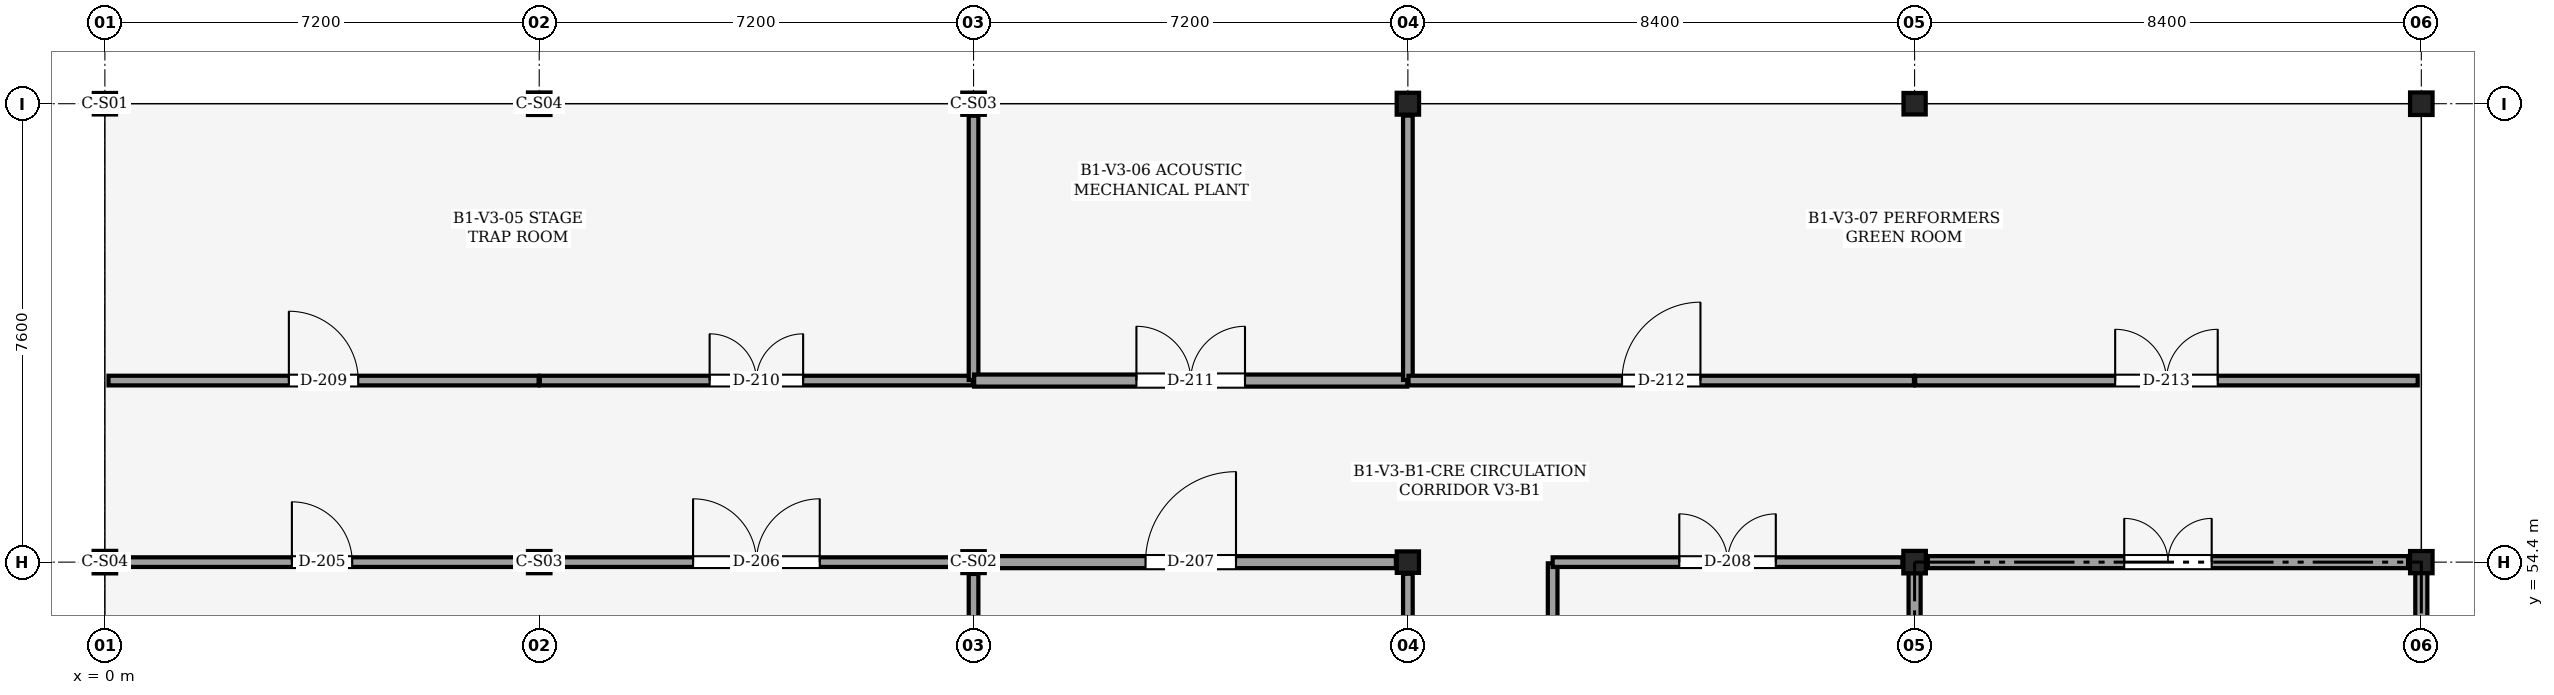
"""IFC4 building model, lengths in metres.
Left out: names, types, materials, properties, quantities, classifications, styles, units other than length and angle.
Written with IfcOpenShell. Run it as: python <this file> out.ifc"""

import sys

from ifc_helpers import new_model, si_unit, direction, frame, frame_2d, origin, origin_2d, place, context, subcontext, project, spatial, rectangle, i_section, extrude, element, fill, save


model = new_model("IFC4")
c1 = context("Model", 3, precision=1e-05, world=origin(), true_north=direction((0.0, 1.0)))
c2 = subcontext(c1, "Body", "Model", "MODEL_VIEW")
j1 = project(units=[si_unit("LENGTHUNIT", "METRE"), si_unit("PLANEANGLEUNIT", "RADIAN")], contexts=[c1])
p1 = place(None, origin())
s1 = spatial("IfcSite", under=j1, at=p1, CompositionType="ELEMENT")
p2 = place(p1, origin())
s2 = spatial("IfcBuilding", under=s1, at=p2, CompositionType="ELEMENT")
p3 = place(p2, frame((0.0, 0.0, -5.4)))
s3 = spatial("IfcBuildingStorey", under=s2, at=p3, CompositionType="ELEMENT", Elevation=-5.4)
p4 = place(p3, frame((0.0, 54.4, 0.0), z_axis=(0.0, 0.0, 1.0), x_axis=(1.0, 0.0, 0.0)))
e1 = element("IfcColumn", 1, at=p4, inside=s3, PredefinedType="COLUMN", context=c2, shape_type="SweptSolid", body=[
    extrude(i_section(OverallWidth=0.373, OverallDepth=0.373, WebThickness=0.016, FlangeThickness=0.026, FilletRadius=0.025, at=origin_2d()), origin(), (0.0, 0.0, 1.0), 5.4),
])
p5 = place(p3, frame((0.0, 62.0, 0.0), z_axis=(0.0, 0.0, 1.0), x_axis=(1.0, 0.0, 0.0)))
e2 = element("IfcColumn", 2, at=p5, inside=s3, PredefinedType="COLUMN", context=c2, shape_type="SweptSolid", body=[
    extrude(i_section(OverallWidth=0.368, OverallDepth=0.356, WebThickness=0.011, FlangeThickness=0.018, FilletRadius=0.025, at=origin_2d()), origin(), (0.0, 0.0, 1.0), 5.4),
])
p6 = place(p3, frame((7.2, 54.4, 0.0), z_axis=(0.0, 0.0, 1.0), x_axis=(1.0, 0.0, 0.0)))
e3 = element("IfcColumn", 3, at=p6, inside=s3, PredefinedType="COLUMN", context=c2, shape_type="SweptSolid", body=[
    extrude(i_section(OverallWidth=0.373, OverallDepth=0.368, WebThickness=0.015, FlangeThickness=0.024, FilletRadius=0.025, at=origin_2d()), origin(), (0.0, 0.0, 1.0), 5.4),
])
p7 = place(p3, frame((7.2, 62.0, 0.0), z_axis=(0.0, 0.0, 1.0), x_axis=(1.0, 0.0, 0.0)))
e4 = element("IfcColumn", 4, at=p7, inside=s3, PredefinedType="COLUMN", context=c2, shape_type="SweptSolid", body=[
    extrude(i_section(OverallWidth=0.373, OverallDepth=0.373, WebThickness=0.016, FlangeThickness=0.026, FilletRadius=0.025, at=origin_2d()), origin(), (0.0, 0.0, 1.0), 5.4),
])
p8 = place(p3, frame((14.4, 54.4, 0.0), z_axis=(0.0, 0.0, 1.0), x_axis=(1.0, 0.0, 0.0)))
e5 = element("IfcColumn", 5, at=p8, inside=s3, PredefinedType="COLUMN", context=c2, shape_type="SweptSolid", body=[
    extrude(i_section(OverallWidth=0.371, OverallDepth=0.363, WebThickness=0.013, FlangeThickness=0.022, FilletRadius=0.025, at=origin_2d()), origin(), (0.0, 0.0, 1.0), 5.4),
])
p9 = place(p3, frame((14.4, 62.0, 0.0), z_axis=(0.0, 0.0, 1.0), x_axis=(1.0, 0.0, 0.0)))
e6 = element("IfcColumn", 6, at=p9, inside=s3, PredefinedType="COLUMN", context=c2, shape_type="SweptSolid", body=[
    extrude(i_section(OverallWidth=0.373, OverallDepth=0.368, WebThickness=0.015, FlangeThickness=0.024, FilletRadius=0.025, at=origin_2d()), origin(), (0.0, 0.0, 1.0), 5.4),
])
p10 = place(p3, frame((21.6, 54.4, 0.0), z_axis=(0.0, 0.0, 1.0), x_axis=(1.0, 0.0, 0.0)))
e7 = element("IfcColumn", 7, at=p10, inside=s3, PredefinedType="COLUMN", context=c2, shape_type="SweptSolid", body=[
    extrude(i_section(OverallWidth=0.368, OverallDepth=0.356, WebThickness=0.011, FlangeThickness=0.018, FilletRadius=0.025, at=origin_2d()), origin(), (0.0, 0.0, 1.0), 5.4),
])
p11 = place(p3, frame((21.6, 62.0, 0.0), z_axis=(0.0, 0.0, 1.0), x_axis=(1.0, 0.0, 0.0)))
e8 = element("IfcColumn", 8, at=p11, inside=s3, PredefinedType="COLUMN", context=c2, shape_type="SweptSolid", body=[
    extrude(i_section(OverallWidth=0.371, OverallDepth=0.363, WebThickness=0.013, FlangeThickness=0.022, FilletRadius=0.025, at=origin_2d()), origin(), (0.0, 0.0, 1.0), 5.4),
])
p12 = place(p3, frame((30.0, 54.4, 0.0), z_axis=(0.0, 0.0, 1.0), x_axis=(1.0, 0.0, 0.0)))
e9 = element("IfcColumn", 9, at=p12, inside=s3, PredefinedType="COLUMN", context=c2, shape_type="SweptSolid", body=[
    extrude(i_section(OverallWidth=0.373, OverallDepth=0.373, WebThickness=0.016, FlangeThickness=0.026, FilletRadius=0.025, at=origin_2d()), origin(), (0.0, 0.0, 1.0), 5.4),
])
p13 = place(p3, frame((30.0, 62.0, 0.0), z_axis=(0.0, 0.0, 1.0), x_axis=(1.0, 0.0, 0.0)))
e10 = element("IfcColumn", 10, at=p13, inside=s3, PredefinedType="COLUMN", context=c2, shape_type="SweptSolid", body=[
    extrude(i_section(OverallWidth=0.368, OverallDepth=0.356, WebThickness=0.011, FlangeThickness=0.018, FilletRadius=0.025, at=origin_2d()), origin(), (0.0, 0.0, 1.0), 5.4),
])
p14 = place(p3, frame((38.4, 54.4, 0.0), z_axis=(0.0, 0.0, 1.0), x_axis=(1.0, 0.0, 0.0)))
e11 = element("IfcColumn", 11, at=p14, inside=s3, PredefinedType="COLUMN", context=c2, shape_type="SweptSolid", body=[
    extrude(i_section(OverallWidth=0.373, OverallDepth=0.368, WebThickness=0.015, FlangeThickness=0.024, FilletRadius=0.025, at=origin_2d()), origin(), (0.0, 0.0, 1.0), 5.4),
])
p15 = place(p3, frame((38.4, 62.0, 0.0), z_axis=(0.0, 0.0, 1.0), x_axis=(1.0, 0.0, 0.0)))
e12 = element("IfcColumn", 12, at=p15, inside=s3, PredefinedType="COLUMN", context=c2, shape_type="SweptSolid", body=[
    extrude(i_section(OverallWidth=0.373, OverallDepth=0.373, WebThickness=0.016, FlangeThickness=0.026, FilletRadius=0.025, at=origin_2d()), origin(), (0.0, 0.0, 1.0), 5.4),
])
p16 = place(p3, frame((30.0, 51.12, 0.0), z_axis=(0.0, 0.0, 1.0), x_axis=(0.0, 1.0, 0.0)))
e13 = element("IfcWall", 13, at=p16, inside=s3, PredefinedType="PARTITIONING", context=c2, shape_type="SweptSolid", body=[
    extrude(rectangle(XDim=3.26, YDim=0.2, at=frame_2d((1.63, 0.0))), origin(), (0.0, 0.0, 1.0), 4.638),
])
p17 = place(p3, frame((38.4, 51.12, 0.0), z_axis=(0.0, 0.0, 1.0), x_axis=(0.0, 1.0, 0.0)))
e14 = element("IfcWall", 14, at=p17, inside=s3, PredefinedType="PARTITIONING", context=c2, shape_type="SweptSolid", body=[
    extrude(rectangle(XDim=3.26, YDim=0.2, at=frame_2d((1.63, 0.0))), origin(), (0.0, 0.0, 1.0), 4.488),
])
p18 = place(p3, frame((30.22, 54.4, 0.0), z_axis=(0.0, 0.0, 1.0), x_axis=(1.0, 0.0, 0.0)))
e15 = element("IfcWall", 15, at=p18, inside=s3, PredefinedType="PARTITIONING", context=c2, shape_type="SweptSolid", body=[
    extrude(rectangle(XDim=7.96, YDim=0.2, at=frame_2d((3.98, 0.0))), origin(), (0.0, 0.0, 1.0), 4.407),
])
p19 = place(p18, frame((3.255, 0.0, 0.0)))
e16 = element("IfcOpeningElement", 16, at=p19, cuts=e15, PredefinedType="OPENING", context=c2, shape_type="SweptSolid", body=[
    extrude(rectangle(XDim=1.45, YDim=2.2, at=frame_2d((0.725, 1.1))), frame((0.0, 0.11, 0.0), z_axis=(0.0, -1.0, 0.0), x_axis=(1.0, 0.0, 0.0)), (0.0, 0.0, 1.0), 0.22),
])
p20 = place(p3, frame((0.201, 54.4, 0.0), z_axis=(0.0, 0.0, 1.0), x_axis=(1.0, 0.0, 0.0)))
e17 = element("IfcWall", 17, at=p20, inside=s3, PredefinedType="PARTITIONING", context=c2, shape_type="SweptSolid", body=[
    extrude(rectangle(XDim=6.797, YDim=0.16, at=frame_2d((3.398, 0.0))), origin(), (0.0, 0.0, 1.0), 4.493),
])
p21 = place(p20, frame((2.898, 0.0, 0.0)))
e18 = element("IfcOpeningElement", 18, at=p21, cuts=e17, PredefinedType="OPENING", context=c2, shape_type="SweptSolid", body=[
    extrude(rectangle(XDim=1.0, YDim=2.15, at=frame_2d((0.5, 1.075))), frame((0.0, 0.09, 0.0), z_axis=(0.0, -1.0, 0.0), x_axis=(1.0, 0.0, 0.0)), (0.0, 0.0, 1.0), 0.18),
])
p22 = place(p3, frame((7.402, 54.4, 0.0), z_axis=(0.0, 0.0, 1.0), x_axis=(1.0, 0.0, 0.0)))
e19 = element("IfcWall", 19, at=p22, inside=s3, PredefinedType="PARTITIONING", context=c2, shape_type="SweptSolid", body=[
    extrude(rectangle(XDim=6.798, YDim=0.16, at=frame_2d((3.399, 0.0))), origin(), (0.0, 0.0, 1.0), 4.551),
])
p23 = place(p22, frame((2.349, 0.0, 0.0)))
e20 = element("IfcOpeningElement", 20, at=p23, cuts=e19, PredefinedType="OPENING", context=c2, shape_type="SweptSolid", body=[
    extrude(rectangle(XDim=2.1, YDim=2.5, at=frame_2d((1.05, 1.25))), frame((0.0, 0.09, 0.0), z_axis=(0.0, -1.0, 0.0), x_axis=(1.0, 0.0, 0.0)), (0.0, 0.0, 1.0), 0.18),
])
p24 = place(p3, frame((14.4, 46.993, 0.0), z_axis=(0.0, 0.0, 1.0), x_axis=(0.0, 1.0, 0.0)))
e21 = element("IfcWall", 21, at=p24, inside=s3, PredefinedType="PARTITIONING", context=c2, shape_type="SweptSolid", body=[
    extrude(rectangle(XDim=7.211, YDim=0.16, at=frame_2d((3.605, 0.0))), origin(), (0.0, 0.0, 1.0), 4.493),
])
p25 = place(p3, frame((14.601, 54.4, 0.0), z_axis=(0.0, 0.0, 1.0), x_axis=(1.0, 0.0, 0.0)))
e22 = element("IfcWall", 22, at=p25, inside=s3, PredefinedType="PARTITIONING", context=c2, shape_type="SweptSolid", body=[
    extrude(rectangle(XDim=6.8, YDim=0.2, at=frame_2d((3.4, 0.0))), origin(), (0.0, 0.0, 1.0), 4.567),
])
p26 = place(p25, frame((2.65, 0.0, 0.0)))
e23 = element("IfcOpeningElement", 23, at=p26, cuts=e22, PredefinedType="OPENING", context=c2, shape_type="SweptSolid", body=[
    extrude(rectangle(XDim=1.5, YDim=2.2, at=frame_2d((0.75, 1.1))), frame((0.0, 0.11, 0.0), z_axis=(0.0, -1.0, 0.0), x_axis=(1.0, 0.0, 0.0)), (0.0, 0.0, 1.0), 0.22),
])
p27 = place(p3, frame((21.6, 47.008, 0.0), z_axis=(0.0, 0.0, 1.0), x_axis=(0.0, 1.0, 0.0)))
e24 = element("IfcWall", 24, at=p27, inside=s3, PredefinedType="PARTITIONING", context=c2, shape_type="SweptSolid", body=[
    extrude(rectangle(XDim=7.199, YDim=0.16, at=frame_2d((3.6, 0.0))), origin(), (0.0, 0.0, 1.0), 4.567),
])
p28 = place(p3, frame((24.0, 46.84, 0.0), z_axis=(0.0, 0.0, 1.0), x_axis=(0.0, 1.0, 0.0)))
e25 = element("IfcWall", 25, at=p28, inside=s3, PredefinedType="PARTITIONING", context=c2, shape_type="SweptSolid", body=[
    extrude(rectangle(XDim=7.54, YDim=0.16, at=frame_2d((3.77, 0.0))), origin(), (0.0, 0.0, 1.0), 5.1),
])
p29 = place(p3, frame((24.0, 54.4, 0.0), z_axis=(0.0, 0.0, 1.0), x_axis=(1.0, 0.0, 0.0)))
e26 = element("IfcWall", 26, at=p29, inside=s3, PredefinedType="PARTITIONING", context=c2, shape_type="SweptSolid", body=[
    extrude(rectangle(XDim=5.799, YDim=0.16, at=frame_2d((2.899, 0.0))), origin(), (0.0, 0.0, 1.0), 4.338),
])
p30 = place(p29, frame((2.099, 0.0, 0.0)))
e27 = element("IfcOpeningElement", 27, at=p30, cuts=e26, PredefinedType="OPENING", context=c2, shape_type="SweptSolid", body=[
    extrude(rectangle(XDim=1.6, YDim=2.35, at=frame_2d((0.8, 1.175))), frame((0.0, 0.09, 0.0), z_axis=(0.0, -1.0, 0.0), x_axis=(1.0, 0.0, 0.0)), (0.0, 0.0, 1.0), 0.18),
])
p31 = place(p3, frame((0.06, 57.41, 0.0), z_axis=(0.0, 0.0, 1.0), x_axis=(1.0, 0.0, 0.0)))
e28 = element("IfcWall", 28, at=p31, inside=s3, PredefinedType="PARTITIONING", context=c2, shape_type="SweptSolid", body=[
    extrude(rectangle(XDim=7.13, YDim=0.16, at=frame_2d((3.565, 0.0))), origin(), (0.0, 0.0, 1.0), 5.1),
])
p32 = place(p31, frame((2.99, 0.0, 0.0)))
e29 = element("IfcOpeningElement", 29, at=p32, cuts=e28, PredefinedType="OPENING", context=c2, shape_type="SweptSolid", body=[
    extrude(rectangle(XDim=1.15, YDim=2.2, at=frame_2d((0.575, 1.1))), frame((0.0, 0.09, 0.0), z_axis=(0.0, -1.0, 0.0), x_axis=(1.0, 0.0, 0.0)), (0.0, 0.0, 1.0), 0.18),
])
p33 = place(p3, frame((7.21, 57.41, 0.0), z_axis=(0.0, 0.0, 1.0), x_axis=(1.0, 0.0, 0.0)))
e30 = element("IfcWall", 30, at=p33, inside=s3, PredefinedType="PARTITIONING", context=c2, shape_type="SweptSolid", body=[
    extrude(rectangle(XDim=7.18, YDim=0.16, at=frame_2d((3.59, 0.0))), origin(), (0.0, 0.0, 1.0), 5.1),
])
p34 = place(p33, frame((2.815, 0.0, 0.0)))
e31 = element("IfcOpeningElement", 31, at=p34, cuts=e30, PredefinedType="OPENING", context=c2, shape_type="SweptSolid", body=[
    extrude(rectangle(XDim=1.55, YDim=2.3, at=frame_2d((0.775, 1.15))), frame((0.0, 0.09, 0.0), z_axis=(0.0, -1.0, 0.0), x_axis=(1.0, 0.0, 0.0)), (0.0, 0.0, 1.0), 0.18),
])
p35 = place(p3, frame((14.4, 57.42, 0.0), z_axis=(0.0, 0.0, 1.0), x_axis=(0.0, 1.0, 0.0)))
e32 = element("IfcWall", 32, at=p35, inside=s3, PredefinedType="PARTITIONING", context=c2, shape_type="SweptSolid", body=[
    extrude(rectangle(XDim=4.381, YDim=0.16, at=frame_2d((2.19, 0.0))), origin(), (0.0, 0.0, 1.0), 4.567),
])
p36 = place(p3, frame((14.41, 57.41, 0.0), z_axis=(0.0, 0.0, 1.0), x_axis=(1.0, 0.0, 0.0)))
e33 = element("IfcWall", 33, at=p36, inside=s3, PredefinedType="PARTITIONING", context=c2, shape_type="SweptSolid", body=[
    extrude(rectangle(XDim=7.18, YDim=0.2, at=frame_2d((3.59, 0.0))), origin(), (0.0, 0.0, 1.0), 5.1),
])
p37 = place(p36, frame((2.69, 0.0, 0.0)))
e34 = element("IfcOpeningElement", 34, at=p37, cuts=e33, PredefinedType="OPENING", context=c2, shape_type="SweptSolid", body=[
    extrude(rectangle(XDim=1.8, YDim=2.4, at=frame_2d((0.9, 1.2))), frame((0.0, 0.11, 0.0), z_axis=(0.0, -1.0, 0.0), x_axis=(1.0, 0.0, 0.0)), (0.0, 0.0, 1.0), 0.22),
])
p38 = place(p3, frame((21.6, 57.42, 0.0), z_axis=(0.0, 0.0, 1.0), x_axis=(0.0, 1.0, 0.0)))
e35 = element("IfcWall", 35, at=p38, inside=s3, PredefinedType="PARTITIONING", context=c2, shape_type="SweptSolid", body=[
    extrude(rectangle(XDim=4.384, YDim=0.16, at=frame_2d((2.192, 0.0))), origin(), (0.0, 0.0, 1.0), 4.638),
])
p39 = place(p3, frame((21.61, 57.41, 0.0), z_axis=(0.0, 0.0, 1.0), x_axis=(1.0, 0.0, 0.0)))
e36 = element("IfcWall", 36, at=p39, inside=s3, PredefinedType="PARTITIONING", context=c2, shape_type="SweptSolid", body=[
    extrude(rectangle(XDim=8.38, YDim=0.16, at=frame_2d((4.19, 0.0))), origin(), (0.0, 0.0, 1.0), 5.1),
])
p40 = place(p39, frame((3.54, 0.0, 0.0)))
e37 = element("IfcOpeningElement", 37, at=p40, cuts=e36, PredefinedType="OPENING", context=c2, shape_type="SweptSolid", body=[
    extrude(rectangle(XDim=1.3, YDim=2.2, at=frame_2d((0.65, 1.1))), frame((0.0, 0.09, 0.0), z_axis=(0.0, -1.0, 0.0), x_axis=(1.0, 0.0, 0.0)), (0.0, 0.0, 1.0), 0.18),
])
p41 = place(p3, frame((30.01, 57.41, 0.0), z_axis=(0.0, 0.0, 1.0), x_axis=(1.0, 0.0, 0.0)))
e38 = element("IfcWall", 38, at=p41, inside=s3, PredefinedType="PARTITIONING", context=c2, shape_type="SweptSolid", body=[
    extrude(rectangle(XDim=8.33, YDim=0.16, at=frame_2d((4.165, 0.0))), origin(), (0.0, 0.0, 1.0), 5.1),
])
p42 = place(p41, frame((3.315, 0.0, 0.0)))
e39 = element("IfcOpeningElement", 39, at=p42, cuts=e38, PredefinedType="OPENING", context=c2, shape_type="SweptSolid", body=[
    extrude(rectangle(XDim=1.7, YDim=2.4, at=frame_2d((0.85, 1.2))), frame((0.0, 0.09, 0.0), z_axis=(0.0, -1.0, 0.0), x_axis=(1.0, 0.0, 0.0)), (0.0, 0.0, 1.0), 0.18),
])
p43 = place(p19, origin())
e40 = element("IfcDoor", 40, at=p43, inside=s3, OperationType="DOUBLE_DOOR_SINGLE_SWING", PredefinedType="DOOR", context=c2, shape_type="SweptSolid", body=[
    extrude(rectangle(XDim=1.45, YDim=2.2, at=frame_2d((0.725, 1.1))), frame((0.0, 0.025, 0.0), z_axis=(0.0, -1.0, 0.0), x_axis=(1.0, 0.0, 0.0)), (0.0, 0.0, 1.0), 0.05),
])
fill(e16, e40)
p44 = place(p21, origin())
e41 = element("IfcDoor", 41, at=p44, inside=s3, OperationType="SINGLE_SWING_LEFT", PredefinedType="DOOR", context=c2, shape_type="SweptSolid", body=[
    extrude(rectangle(XDim=1.0, YDim=2.15, at=frame_2d((0.5, 1.075))), frame((0.0, 0.025, 0.0), z_axis=(0.0, -1.0, 0.0), x_axis=(1.0, 0.0, 0.0)), (0.0, 0.0, 1.0), 0.05),
])
fill(e18, e41)
p45 = place(p23, origin())
e42 = element("IfcDoor", 42, at=p45, inside=s3, OperationType="DOUBLE_DOOR_SINGLE_SWING", PredefinedType="DOOR", context=c2, shape_type="SweptSolid", body=[
    extrude(rectangle(XDim=2.1, YDim=2.5, at=frame_2d((1.05, 1.25))), frame((0.0, 0.025, 0.0), z_axis=(0.0, -1.0, 0.0), x_axis=(1.0, 0.0, 0.0)), (0.0, 0.0, 1.0), 0.05),
])
fill(e20, e42)
p46 = place(p26, origin())
e43 = element("IfcDoor", 43, at=p46, inside=s3, OperationType="SINGLE_SWING_RIGHT", PredefinedType="DOOR", context=c2, shape_type="SweptSolid", body=[
    extrude(rectangle(XDim=1.5, YDim=2.2, at=frame_2d((0.75, 1.1))), frame((0.0, 0.025, 0.0), z_axis=(0.0, -1.0, 0.0), x_axis=(1.0, 0.0, 0.0)), (0.0, 0.0, 1.0), 0.05),
])
fill(e23, e43)
p47 = place(p30, origin())
e44 = element("IfcDoor", 44, at=p47, inside=s3, OperationType="DOUBLE_DOOR_SINGLE_SWING", PredefinedType="DOOR", context=c2, shape_type="SweptSolid", body=[
    extrude(rectangle(XDim=1.6, YDim=2.35, at=frame_2d((0.8, 1.175))), frame((0.0, 0.025, 0.0), z_axis=(0.0, -1.0, 0.0), x_axis=(1.0, 0.0, 0.0)), (0.0, 0.0, 1.0), 0.05),
])
fill(e27, e44)
p48 = place(p32, origin())
e45 = element("IfcDoor", 45, at=p48, inside=s3, OperationType="SINGLE_SWING_LEFT", PredefinedType="DOOR", context=c2, shape_type="SweptSolid", body=[
    extrude(rectangle(XDim=1.15, YDim=2.2, at=frame_2d((0.575, 1.1))), frame((0.0, 0.025, 0.0), z_axis=(0.0, -1.0, 0.0), x_axis=(1.0, 0.0, 0.0)), (0.0, 0.0, 1.0), 0.05),
])
fill(e29, e45)
p49 = place(p34, origin())
e46 = element("IfcDoor", 46, at=p49, inside=s3, OperationType="DOUBLE_DOOR_SINGLE_SWING", PredefinedType="DOOR", context=c2, shape_type="SweptSolid", body=[
    extrude(rectangle(XDim=1.55, YDim=2.3, at=frame_2d((0.775, 1.15))), frame((0.0, 0.025, 0.0), z_axis=(0.0, -1.0, 0.0), x_axis=(1.0, 0.0, 0.0)), (0.0, 0.0, 1.0), 0.05),
])
fill(e31, e46)
p50 = place(p37, origin())
e47 = element("IfcDoor", 47, at=p50, inside=s3, OperationType="DOUBLE_DOOR_SINGLE_SWING", PredefinedType="DOOR", context=c2, shape_type="SweptSolid", body=[
    extrude(rectangle(XDim=1.8, YDim=2.4, at=frame_2d((0.9, 1.2))), frame((0.0, 0.025, 0.0), z_axis=(0.0, -1.0, 0.0), x_axis=(1.0, 0.0, 0.0)), (0.0, 0.0, 1.0), 0.05),
])
fill(e34, e47)
p51 = place(p40, origin())
e48 = element("IfcDoor", 48, at=p51, inside=s3, OperationType="SINGLE_SWING_RIGHT", PredefinedType="DOOR", context=c2, shape_type="SweptSolid", body=[
    extrude(rectangle(XDim=1.3, YDim=2.2, at=frame_2d((0.65, 1.1))), frame((0.0, 0.025, 0.0), z_axis=(0.0, -1.0, 0.0), x_axis=(1.0, 0.0, 0.0)), (0.0, 0.0, 1.0), 0.05),
])
fill(e37, e48)
p52 = place(p42, origin())
e49 = element("IfcDoor", 49, at=p52, inside=s3, OperationType="DOUBLE_DOOR_SINGLE_SWING", PredefinedType="DOOR", context=c2, shape_type="SweptSolid", body=[
    extrude(rectangle(XDim=1.7, YDim=2.4, at=frame_2d((0.85, 1.2))), frame((0.0, 0.025, 0.0), z_axis=(0.0, -1.0, 0.0), x_axis=(1.0, 0.0, 0.0)), (0.0, 0.0, 1.0), 0.05),
])
fill(e39, e49)
save(model, sys.argv[1])
